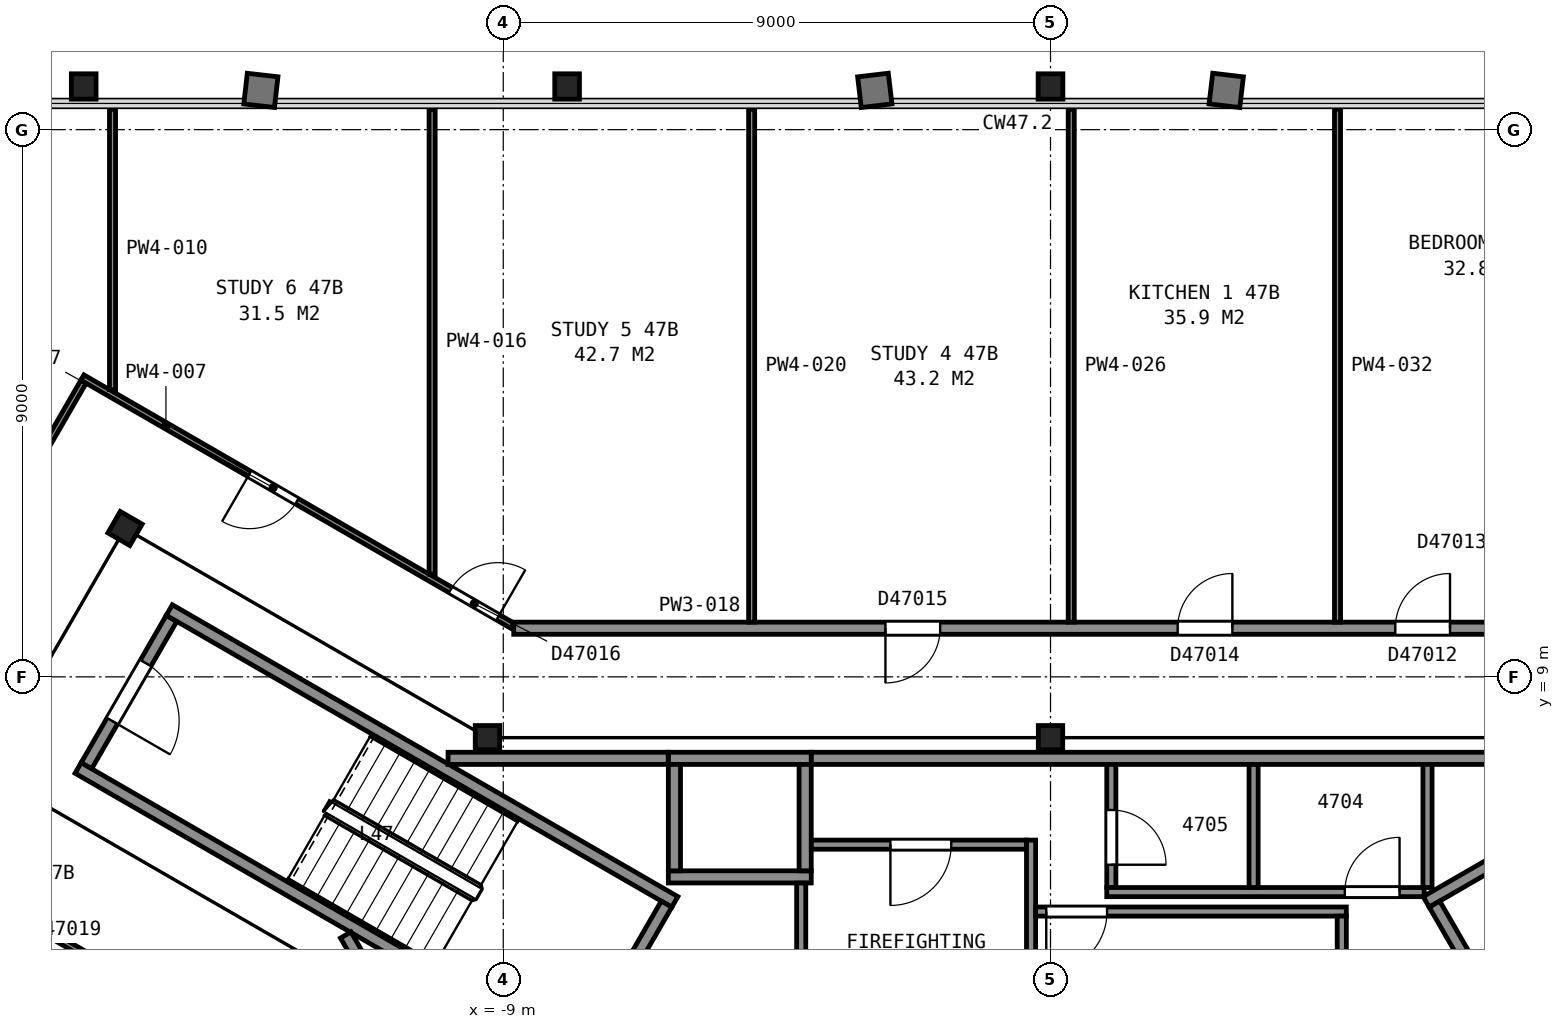
"""IFC4 building model, lengths in metres.
Left out: names, types, materials, properties, quantities, classifications, styles, units other than length and angle.
Written with IfcOpenShell. Run it as: python <this file> out.ifc"""

import sys

from ifc_helpers import new_model, si_unit, direction, frame, frame_2d, origin, origin_2d, place, context, subcontext, project, spatial, rectangle, i_section, extrude, element, fill, save


model = new_model("IFC4")
c1 = context("Model", 3, precision=1e-05, world=origin(), true_north=direction((0.0, 1.0)))
c2 = subcontext(c1, "Body", "Model", "MODEL_VIEW")
j1 = project(units=[si_unit("LENGTHUNIT", "METRE"), si_unit("PLANEANGLEUNIT", "RADIAN")], contexts=[c1])
p1 = place(None, origin())
s1 = spatial("IfcSite", under=j1, at=p1, CompositionType="ELEMENT")
p2 = place(p1, origin())
s2 = spatial("IfcBuilding", under=s1, at=p2, CompositionType="ELEMENT")
p3 = place(p2, frame((0.0, 0.0, 189.5)))
s3 = spatial("IfcBuildingStorey", under=s2, at=p3, CompositionType="ELEMENT", Elevation=189.5)
p4 = place(p3, frame((0.0, 18.71, 0.03), z_axis=(0.0, 0.0, 1.0), x_axis=(1.0, 0.0, 0.0)))
e1 = element("IfcColumn", 1, at=p4, inside=s3, PredefinedType="COLUMN", context=c2, shape_type="SweptSolid", body=[
    extrude(i_section(OverallWidth=0.406, OverallDepth=0.417, WebThickness=0.03, FlangeThickness=0.048, FilletRadius=0.015, at=origin_2d()), origin(), (0.0, 0.0, 1.0), 3.67),
])
p5 = place(p3, frame((-7.95, 18.71, 0.035), z_axis=(0.0, 0.0, 1.0), x_axis=(1.0, 0.0, 0.0)))
e2 = element("IfcColumn", 2, at=p5, inside=s3, PredefinedType="COLUMN", context=c2, shape_type="SweptSolid", body=[
    extrude(i_section(OverallWidth=0.406, OverallDepth=0.417, WebThickness=0.03, FlangeThickness=0.048, FilletRadius=0.015, at=origin_2d()), origin(), (0.0, 0.0, 1.0), 3.665),
])
p6 = place(p3, frame((-15.9, 18.71, 0.04), z_axis=(0.0, 0.0, 1.0), x_axis=(1.0, 0.0, 0.0)))
e3 = element("IfcColumn", 3, at=p6, inside=s3, PredefinedType="COLUMN", context=c2, shape_type="SweptSolid", body=[
    extrude(i_section(OverallWidth=0.406, OverallDepth=0.417, WebThickness=0.03, FlangeThickness=0.048, FilletRadius=0.015, at=origin_2d()), origin(), (0.0, 0.0, 1.0), 3.66),
])
for number, where, z_axis, x_axis in (
    (4, (0.0, 8.0, 0.0), (0.0, 0.0, 1.0), (1.0, 0.0, 0.0)),
    (5, (-9.26, 8.0, 0.0), (0.0, 0.0, 1.0), (1.0, 0.0, 0.0)),
):
    element("IfcColumn", number, at=place(p3, frame(where, z_axis=z_axis, x_axis=x_axis)), inside=s3, PredefinedType="COLUMN", context=c2, shape_type="SweptSolid", body=[
        extrude(i_section(OverallWidth=0.401, OverallDepth=0.399, WebThickness=0.025, FlangeThickness=0.04, FilletRadius=0.015, at=origin_2d()), origin(), (0.0, 0.0, 1.0), 3.7),
    ])
p7 = place(p3, frame((-15.22, 11.44, 0.0), z_axis=(0.0, 0.0, 1.0), x_axis=(0.5, 0.866025403784, 0.0)))
e6 = element("IfcColumn", 6, at=p7, inside=s3, PredefinedType="COLUMN", context=c2, shape_type="SweptSolid", body=[
    extrude(i_section(OverallWidth=0.406, OverallDepth=0.417, WebThickness=0.03, FlangeThickness=0.048, FilletRadius=0.015, at=origin_2d()), origin(), (0.0, 0.0, 1.0), 3.7),
])
p8 = place(p3, frame((6.178, 5.299, 0.0), z_axis=(0.0, 0.0, 1.0), x_axis=(0.866019993635, 0.500009370536, 0.0)))
e7 = element("IfcWall", 7, at=p8, inside=s3, PredefinedType="PARTITIONING", context=c2, shape_type="SweptSolid", body=[
    extrude(rectangle(XDim=9.6, YDim=0.2, at=frame_2d((4.8, 0.0))), origin(), (0.0, 0.0, 1.0), 3.45),
])
p9 = place(p3, frame((7.715, 2.838, 0.0), z_axis=(0.0, 0.0, 1.0), x_axis=(-0.500049511043, 0.865996816683, 0.0)))
e8 = element("IfcWall", 8, at=p9, inside=s3, PredefinedType="PARTITIONING", context=c2, shape_type="SweptSolid", body=[
    extrude(rectangle(XDim=2.8, YDim=0.2, at=frame_2d((1.4, 0.0))), origin(), (0.0, 0.0, 1.0), 3.45),
])
p10 = place(p3, frame((-14.455, 9.962, 0.0), z_axis=(0.0, 0.0, 1.0), x_axis=(-0.500049511043, -0.865996816683, 0.0)))
e9 = element("IfcWall", 9, at=p10, inside=s3, PredefinedType="PARTITIONING", context=c2, shape_type="SweptSolid", body=[
    extrude(rectangle(XDim=2.8, YDim=0.2, at=frame_2d((1.4, 0.0))), origin(), (0.0, 0.0, 1.0), 3.45),
])
p11 = place(p10, frame((0.85, 0.0, 0.0)))
e10 = element("IfcOpeningElement", 10, at=p11, cuts=e9, PredefinedType="OPENING", context=c2, shape_type="SweptSolid", body=[
    extrude(rectangle(XDim=1.1, YDim=2.1, at=frame_2d((0.55, 1.05))), frame((0.0, 0.11, 0.0), z_axis=(0.0, -1.0, 0.0), x_axis=(1.0, 0.0, 0.0)), (0.0, 0.0, 1.0), 0.22),
])
for number, where, z_axis, x_axis in (
    (11, (-7.678, 2.701, 0.0), (0.0, 0.0, 1.0), (-0.866, 0.5, 0.0)),
    (12, (-6.178, 5.299, 0.0), (0.0, 0.0, 1.0), (-0.866, 0.5, 0.0)),
):
    element("IfcWall", number, at=place(p3, frame(where, z_axis=z_axis, x_axis=x_axis)), inside=s3, PredefinedType="PARTITIONING", context=c2, shape_type="SweptSolid", body=[
        extrude(rectangle(XDim=9.6, YDim=0.2, at=frame_2d((4.8, 0.0))), origin(), (0.0, 0.0, 1.0), 3.45),
    ])
p12 = place(p3, frame((-6.315, 5.262, 0.0), z_axis=(0.0, 0.0, 1.0), x_axis=(-0.500049511043, -0.865996816683, 0.0)))
e13 = element("IfcWall", 13, at=p12, inside=s3, PredefinedType="PARTITIONING", context=c2, shape_type="SweptSolid", body=[
    extrude(rectangle(XDim=2.8, YDim=0.2, at=frame_2d((1.4, 0.0))), origin(), (0.0, 0.0, 1.0), 3.45),
])
for number, where, z_axis, x_axis in (
    (14, (-6.285, 5.71, 0.0), (0.0, 0.0, 1.0), (1.0, 0.0, 0.0)),
    (15, (-6.285, 7.66, 0.0), (0.0, 0.0, 1.0), (1.0, 0.0, 0.0)),
):
    element("IfcWall", number, at=place(p3, frame(where, z_axis=z_axis, x_axis=x_axis)), inside=s3, PredefinedType="PARTITIONING", context=c2, shape_type="SweptSolid", body=[
        extrude(rectangle(XDim=2.35, YDim=0.2, at=frame_2d((1.175, 0.0))), origin(), (0.0, 0.0, 1.0), 3.7),
    ])
for number, where, z_axis, x_axis in (
    (16, (-4.035, 5.81, 0.0), (0.0, 0.0, 1.0), (0.0, 1.0, 0.0)),
    (17, (-6.185, 5.81, 0.0), (0.0, 0.0, 1.0), (0.0, 1.0, 0.0)),
):
    element("IfcWall", number, at=place(p3, frame(where, z_axis=z_axis, x_axis=x_axis)), inside=s3, PredefinedType="PARTITIONING", context=c2, shape_type="SweptSolid", body=[
        extrude(rectangle(XDim=1.75, YDim=0.2, at=frame_2d((0.875, 0.0))), origin(), (0.0, 0.0, 1.0), 3.7),
    ])
p13 = place(p3, frame((-11.591, 4.755, 0.0), z_axis=(0.0, 0.0, 1.0), x_axis=(0.500043977787, -0.866000011708, 0.0)))
e18 = element("IfcWall", 18, at=p13, inside=s3, PredefinedType="PARTITIONING", context=c2, shape_type="SweptSolid", body=[
    extrude(rectangle(XDim=6.617, YDim=0.2, at=frame_2d((3.308, 0.0))), origin(), (0.0, 0.0, 1.0), 3.45),
])
p14 = place(p13, frame((3.695, 0.0, 0.0)))
e19 = element("IfcOpeningElement", 19, at=p14, cuts=e18, PredefinedType="OPENING", context=c2, shape_type="SweptSolid", body=[
    extrude(rectangle(XDim=1.8, YDim=2.1, at=frame_2d((0.9, 1.05))), frame((0.0, 0.11, 0.0), z_axis=(0.0, -1.0, 0.0), x_axis=(1.0, 0.0, 0.0)), (0.0, 0.0, 1.0), 0.22),
])
p15 = place(p3, frame((-9.908, 7.66, 0.0), z_axis=(0.0, 0.0, 1.0), x_axis=(1.0, 0.0, 0.0)))
e20 = element("IfcWall", 20, at=p15, inside=s3, PredefinedType="PARTITIONING", context=c2, shape_type="SweptSolid", body=[
    extrude(rectangle(XDim=3.621, YDim=0.2, at=frame_2d((1.811, 0.0))), origin(), (0.0, 0.0, 1.0), 3.45),
])
p16 = place(p3, frame((-4.1, 2.085, 0.0), z_axis=(0.0, 0.0, 1.0), x_axis=(0.0, 1.0, 0.0)))
e21 = element("IfcWall", 21, at=p16, inside=s3, PredefinedType="PARTITIONING", context=c2, shape_type="SweptSolid", body=[
    extrude(rectangle(XDim=3.523, YDim=0.15, at=frame_2d((1.761, 0.0))), origin(), (0.0, 0.0, 1.0), 3.45),
])
p17 = place(p3, frame((-3.933, 6.24, 0.0), z_axis=(0.0, 0.0, 1.0), x_axis=(1.0, 0.0, 0.0)))
e22 = element("IfcWall", 22, at=p17, inside=s3, PredefinedType="PARTITIONING", context=c2, shape_type="SweptSolid", body=[
    extrude(rectangle(XDim=3.538, YDim=0.15, at=frame_2d((1.769, 0.0))), origin(), (0.0, 0.0, 1.0), 3.45),
])
p18 = place(p17, frame((1.3, 0.0, 0.0)))
e23 = element("IfcOpeningElement", 23, at=p18, cuts=e22, PredefinedType="OPENING", context=c2, shape_type="SweptSolid", body=[
    extrude(rectangle(XDim=1.0, YDim=2.1, at=frame_2d((0.5, 1.05))), frame((0.0, 0.085, 0.0), z_axis=(0.0, -1.0, 0.0), x_axis=(1.0, 0.0, 0.0)), (0.0, 0.0, 1.0), 0.17),
])
p19 = place(p3, frame((-3.933, 7.66, 0.0), z_axis=(0.0, 0.0, 1.0), x_axis=(1.0, 0.0, 0.0)))
e24 = element("IfcWall", 24, at=p19, inside=s3, PredefinedType="PARTITIONING", context=c2, shape_type="SweptSolid", body=[
    extrude(rectangle(XDim=13.841, YDim=0.2, at=frame_2d((6.92, 0.0))), origin(), (0.0, 0.0, 1.0), 3.45),
])
p20 = place(p3, frame((-0.32, 2.252, 0.0), z_axis=(0.0, 0.0, 1.0), x_axis=(0.0, 1.0, 0.0)))
e25 = element("IfcWall", 25, at=p20, inside=s3, PredefinedType="PARTITIONING", context=c2, shape_type="SweptSolid", body=[
    extrude(rectangle(XDim=4.063, YDim=0.15, at=frame_2d((2.031, 0.0))), origin(), (0.0, 0.0, 1.0), 3.45),
])
p21 = place(p3, frame((-0.245, 5.14, 0.0), z_axis=(0.0, 0.0, 1.0), x_axis=(1.0, 0.0, 0.0)))
e26 = element("IfcWall", 26, at=p21, inside=s3, PredefinedType="PARTITIONING", context=c2, shape_type="SweptSolid", body=[
    extrude(rectangle(XDim=5.11, YDim=0.15, at=frame_2d((2.555, 0.0))), origin(), (0.0, 0.0, 1.0), 3.45),
])
p22 = place(p21, frame((0.175, 0.0, 0.0)))
e27 = element("IfcOpeningElement", 27, at=p22, cuts=e26, PredefinedType="OPENING", context=c2, shape_type="SweptSolid", body=[
    extrude(rectangle(XDim=1.0, YDim=2.1, at=frame_2d((0.5, 1.05))), frame((0.0, 0.085, 0.0), z_axis=(0.0, -1.0, 0.0), x_axis=(1.0, 0.0, 0.0)), (0.0, 0.0, 1.0), 0.17),
])
p23 = place(p3, frame((1.0, 7.56, 0.0), z_axis=(0.0, 0.0, 1.0), x_axis=(0.0, -1.0, 0.0)))
e28 = element("IfcWall", 28, at=p23, inside=s3, PredefinedType="PARTITIONING", context=c2, shape_type="SweptSolid", body=[
    extrude(rectangle(XDim=2.025, YDim=0.15, at=frame_2d((1.013, 0.0))), origin(), (0.0, 0.0, 1.0), 3.45),
])
p24 = place(p23, frame((0.75, 0.0, 0.0)))
e29 = element("IfcOpeningElement", 29, at=p24, cuts=e28, PredefinedType="OPENING", context=c2, shape_type="SweptSolid", body=[
    extrude(rectangle(XDim=0.9, YDim=2.1, at=frame_2d((0.45, 1.05))), frame((0.0, 0.085, 0.0), z_axis=(0.0, -1.0, 0.0), x_axis=(1.0, 0.0, 0.0)), (0.0, 0.0, 1.0), 0.17),
])
p25 = place(p3, frame((0.925, 5.46, 0.0), z_axis=(0.0, 0.0, 1.0), x_axis=(1.0, 0.0, 0.0)))
e30 = element("IfcWall", 30, at=p25, inside=s3, PredefinedType="PARTITIONING", context=c2, shape_type="SweptSolid", body=[
    extrude(rectangle(XDim=5.22, YDim=0.15, at=frame_2d((2.61, 0.0))), origin(), (0.0, 0.0, 1.0), 3.45),
])
p26 = place(p25, frame((3.915, 0.0, 0.0)))
e31 = element("IfcOpeningElement", 31, at=p26, cuts=e30, PredefinedType="OPENING", context=c2, shape_type="SweptSolid", body=[
    extrude(rectangle(XDim=0.9, YDim=2.1, at=frame_2d((0.45, 1.05))), frame((0.0, 0.085, 0.0), z_axis=(0.0, -1.0, 0.0), x_axis=(1.0, 0.0, 0.0)), (0.0, 0.0, 1.0), 0.17),
])
p27 = place(p3, frame((3.34, 5.535, 0.0), z_axis=(0.0, 0.0, 1.0), x_axis=(0.0, 1.0, 0.0)))
e32 = element("IfcWall", 32, at=p27, inside=s3, PredefinedType="PARTITIONING", context=c2, shape_type="SweptSolid", body=[
    extrude(rectangle(XDim=2.025, YDim=0.15, at=frame_2d((1.013, 0.0))), origin(), (0.0, 0.0, 1.0), 3.45),
])
p28 = place(p3, frame((4.79, 2.085, 0.0), z_axis=(0.0, 0.0, 1.0), x_axis=(0.0, 1.0, 0.0)))
e33 = element("IfcWall", 33, at=p28, inside=s3, PredefinedType="PARTITIONING", context=c2, shape_type="SweptSolid", body=[
    extrude(rectangle(XDim=2.98, YDim=0.15, at=frame_2d((1.49, 0.0))), origin(), (0.0, 0.0, 1.0), 3.45),
])
p29 = place(p3, frame((6.2, 5.535, 0.0), z_axis=(0.0, 0.0, 1.0), x_axis=(0.0, 1.0, 0.0)))
e34 = element("IfcWall", 34, at=p29, inside=s3, PredefinedType="PARTITIONING", context=c2, shape_type="SweptSolid", body=[
    extrude(rectangle(XDim=2.025, YDim=0.15, at=frame_2d((1.013, 0.0))), origin(), (0.0, 0.0, 1.0), 3.45),
])
p30 = place(p3, frame((-19.955, 6.844, 0.0), z_axis=(0.0, 0.0, 1.0), x_axis=(0.500415732313, 0.865785247537, 0.0)))
e35 = element("IfcWall", 35, at=p30, inside=s3, PredefinedType="PARTITIONING", context=c2, shape_type="SweptSolid", body=[
    extrude(rectangle(XDim=8.097, YDim=0.1, at=frame_2d((4.049, 0.0))), origin(), (0.0, 0.0, 1.0), 2.713),
])
p31 = place(p30, frame((3.45, 0.0, 0.0)))
e36 = element("IfcOpeningElement", 36, at=p31, cuts=e35, PredefinedType="OPENING", context=c2, shape_type="SweptSolid", body=[
    extrude(rectangle(XDim=1.2, YDim=2.1, at=frame_2d((0.6, 1.05))), frame((0.0, 0.06, 0.0), z_axis=(0.0, -1.0, 0.0), x_axis=(1.0, 0.0, 0.0)), (0.0, 0.0, 1.0), 0.12),
])
p32 = place(p3, frame((-12.952, 2.744, 0.0), z_axis=(0.0, 0.0, 1.0), x_axis=(-0.86608949446, 0.499888975259, 0.0)))
e37 = element("IfcWall", 37, at=p32, inside=s3, PredefinedType="PARTITIONING", context=c2, shape_type="SweptSolid", body=[
    extrude(rectangle(XDim=8.165, YDim=0.1, at=frame_2d((4.083, 0.0))), origin(), (0.0, 0.0, 1.0), 2.713),
])
p33 = place(p32, frame((4.741, 0.0, 0.0)))
e38 = element("IfcOpeningElement", 38, at=p33, cuts=e37, PredefinedType="OPENING", context=c2, shape_type="SweptSolid", body=[
    extrude(rectangle(XDim=0.9, YDim=2.1, at=frame_2d((0.45, 1.05))), frame((0.0, 0.06, 0.0), z_axis=(0.0, -1.0, 0.0), x_axis=(1.0, 0.0, 0.0)), (0.0, 0.0, 1.0), 0.12),
])
p34 = place(p32, frame((0.928, 0.0, 0.0)))
e39 = element("IfcOpeningElement", 39, at=p34, cuts=e37, PredefinedType="OPENING", context=c2, shape_type="SweptSolid", body=[
    extrude(rectangle(XDim=0.9, YDim=2.1, at=frame_2d((0.45, 1.05))), frame((0.0, 0.06, 0.0), z_axis=(0.0, -1.0, 0.0), x_axis=(1.0, 0.0, 0.0)), (0.0, 0.0, 1.0), 0.12),
])
p35 = place(p3, frame((-15.921, 13.923, 0.0), z_axis=(0.0, 0.0, 1.0), x_axis=(0.866088973199, -0.499889878377, 0.0)))
e40 = element("IfcWall", 40, at=p35, inside=s3, PredefinedType="PARTITIONING", context=c2, shape_type="SweptSolid", body=[
    extrude(rectangle(XDim=8.163, YDim=0.1, at=frame_2d((4.082, 0.0))), origin(), (0.0, 0.0, 1.0), 2.713),
])
p36 = place(p35, frame((6.99, 0.0, 0.0)))
e41 = element("IfcOpeningElement", 41, at=p36, cuts=e40, PredefinedType="OPENING", context=c2, shape_type="SweptSolid", body=[
    extrude(rectangle(XDim=0.9, YDim=2.1, at=frame_2d((0.45, 1.05))), frame((0.0, 0.06, 0.0), z_axis=(0.0, -1.0, 0.0), x_axis=(1.0, 0.0, 0.0)), (0.0, 0.0, 1.0), 0.12),
])
p37 = place(p35, frame((3.172, 0.0, 0.0)))
e42 = element("IfcOpeningElement", 42, at=p37, cuts=e40, PredefinedType="OPENING", context=c2, shape_type="SweptSolid", body=[
    extrude(rectangle(XDim=0.9, YDim=2.1, at=frame_2d((0.45, 1.05))), frame((0.0, 0.06, 0.0), z_axis=(0.0, -1.0, 0.0), x_axis=(1.0, 0.0, 0.0)), (0.0, 0.0, 1.0), 0.12),
])
p38 = place(p3, frame((-15.426, 13.724, 0.0), z_axis=(0.0, 0.0, 1.0), x_axis=(0.0, 1.0, 0.0)))
e43 = element("IfcWall", 43, at=p38, inside=s3, PredefinedType="PARTITIONING", context=c2, shape_type="SweptSolid", body=[
    extrude(rectangle(XDim=4.611, YDim=0.1, at=frame_2d((2.306, 0.0))), origin(), (0.0, 0.0, 1.0), 2.713),
])
p39 = place(p3, frame((-10.17, 10.691, 0.0), z_axis=(0.0, 0.0, 1.0), x_axis=(0.0, 1.0, 0.0)))
e44 = element("IfcWall", 44, at=p39, inside=s3, PredefinedType="PARTITIONING", context=c2, shape_type="SweptSolid", body=[
    extrude(rectangle(XDim=7.644, YDim=0.1, at=frame_2d((3.822, 0.0))), origin(), (0.0, 0.0, 1.0), 2.713),
])
p40 = place(p3, frame((-8.828, 9.8, 0.0), z_axis=(0.0, 0.0, 1.0), x_axis=(1.0, 0.0, 0.0)))
e45 = element("IfcWall", 45, at=p40, inside=s3, PredefinedType="PARTITIONING", context=c2, shape_type="SweptSolid", body=[
    extrude(rectangle(XDim=17.706, YDim=0.2, at=frame_2d((8.853, 0.0))), origin(), (0.0, 0.0, 1.0), 2.713),
])
p41 = place(p40, frame((14.498, 0.0, 0.0)))
e46 = element("IfcOpeningElement", 46, at=p41, cuts=e45, PredefinedType="OPENING", context=c2, shape_type="SweptSolid", body=[
    extrude(rectangle(XDim=0.9, YDim=2.1, at=frame_2d((0.45, 1.05))), frame((0.0, 0.11, 0.0), z_axis=(0.0, -1.0, 0.0), x_axis=(1.0, 0.0, 0.0)), (0.0, 0.0, 1.0), 0.22),
])
p42 = place(p40, frame((10.919, 0.0, 0.0)))
e47 = element("IfcOpeningElement", 47, at=p42, cuts=e45, PredefinedType="OPENING", context=c2, shape_type="SweptSolid", body=[
    extrude(rectangle(XDim=0.9, YDim=2.1, at=frame_2d((0.45, 1.05))), frame((0.0, 0.11, 0.0), z_axis=(0.0, -1.0, 0.0), x_axis=(1.0, 0.0, 0.0)), (0.0, 0.0, 1.0), 0.22),
])
p43 = place(p40, frame((6.113, 0.0, 0.0)))
e48 = element("IfcOpeningElement", 48, at=p43, cuts=e45, PredefinedType="OPENING", context=c2, shape_type="SweptSolid", body=[
    extrude(rectangle(XDim=0.9, YDim=2.1, at=frame_2d((0.45, 1.05))), frame((0.0, 0.11, 0.0), z_axis=(0.0, -1.0, 0.0), x_axis=(1.0, 0.0, 0.0)), (0.0, 0.0, 1.0), 0.22),
])
for number, where, z_axis, x_axis in (
    (49, (-4.915, 9.9, 0.0), (0.0, 0.0, 1.0), (0.0, 1.0, 0.0)),
    (50, (0.341, 9.9, 0.0), (0.0, 0.0, 1.0), (0.0, 1.0, 0.0)),
    (51, (4.72, 9.9, 0.0), (0.0, 0.0, 1.0), (0.0, 1.0, 0.0)),
):
    element("IfcWall", number, at=place(p3, frame(where, z_axis=z_axis, x_axis=x_axis)), inside=s3, PredefinedType="PARTITIONING", context=c2, shape_type="SweptSolid", body=[
        extrude(rectangle(XDim=8.435, YDim=0.1, at=frame_2d((4.218, 0.0))), origin(), (0.0, 0.0, 1.0), 2.713),
    ])
p44 = place(p11, origin())
e52 = element("IfcDoor", 52, at=p44, inside=s3, OperationType="SINGLE_SWING_RIGHT", PredefinedType="DOOR", context=c2, shape_type="SweptSolid", body=[
    extrude(rectangle(XDim=1.1, YDim=2.1, at=frame_2d((0.55, 1.05))), frame((0.0, 0.025, 0.0), z_axis=(0.0, -1.0, 0.0), x_axis=(1.0, 0.0, 0.0)), (0.0, 0.0, 1.0), 0.05),
])
fill(e10, e52)
p45 = place(p18, origin())
e53 = element("IfcDoor", 53, at=p45, inside=s3, OperationType="SINGLE_SWING_LEFT", PredefinedType="DOOR", context=c2, shape_type="SweptSolid", body=[
    extrude(rectangle(XDim=1.0, YDim=2.1, at=frame_2d((0.5, 1.05))), frame((0.0, 0.025, 0.0), z_axis=(0.0, -1.0, 0.0), x_axis=(1.0, 0.0, 0.0)), (0.0, 0.0, 1.0), 0.05),
])
fill(e23, e53)
p46 = place(p22, origin())
e54 = element("IfcDoor", 54, at=p46, inside=s3, OperationType="SINGLE_SWING_LEFT", PredefinedType="DOOR", context=c2, shape_type="SweptSolid", body=[
    extrude(rectangle(XDim=1.0, YDim=2.1, at=frame_2d((0.5, 1.05))), frame((0.0, 0.025, 0.0), z_axis=(0.0, -1.0, 0.0), x_axis=(1.0, 0.0, 0.0)), (0.0, 0.0, 1.0), 0.05),
])
fill(e27, e54)
p47 = place(p24, origin())
e55 = element("IfcDoor", 55, at=p47, inside=s3, OperationType="SINGLE_SWING_RIGHT", PredefinedType="DOOR", context=c2, shape_type="SweptSolid", body=[
    extrude(rectangle(XDim=0.9, YDim=2.1, at=frame_2d((0.45, 1.05))), frame((0.0, 0.025, 0.0), z_axis=(0.0, -1.0, 0.0), x_axis=(1.0, 0.0, 0.0)), (0.0, 0.0, 1.0), 0.05),
])
fill(e29, e55)
p48 = place(p26, origin())
e56 = element("IfcDoor", 56, at=p48, inside=s3, OperationType="SINGLE_SWING_RIGHT", PredefinedType="DOOR", context=c2, shape_type="SweptSolid", body=[
    extrude(rectangle(XDim=0.9, YDim=2.1, at=frame_2d((0.45, 1.05))), frame((0.0, 0.025, 0.0), z_axis=(0.0, -1.0, 0.0), x_axis=(1.0, 0.0, 0.0)), (0.0, 0.0, 1.0), 0.05),
])
fill(e31, e56)
p49 = place(p36, origin())
e57 = element("IfcDoor", 57, at=p49, inside=s3, OperationType="SINGLE_SWING_RIGHT", PredefinedType="DOOR", context=c2, shape_type="SweptSolid", body=[
    extrude(rectangle(XDim=0.9, YDim=2.1, at=frame_2d((0.45, 1.05))), frame((0.0, 0.025, 0.0), z_axis=(0.0, -1.0, 0.0), x_axis=(1.0, 0.0, 0.0)), (0.0, 0.0, 1.0), 0.05),
])
fill(e41, e57)
p50 = place(p37, origin())
e58 = element("IfcDoor", 58, at=p50, inside=s3, OperationType="SINGLE_SWING_LEFT", PredefinedType="DOOR", context=c2, shape_type="SweptSolid", body=[
    extrude(rectangle(XDim=0.9, YDim=2.1, at=frame_2d((0.45, 1.05))), frame((0.0, 0.025, 0.0), z_axis=(0.0, -1.0, 0.0), x_axis=(1.0, 0.0, 0.0)), (0.0, 0.0, 1.0), 0.05),
])
fill(e42, e58)
p51 = place(p41, origin())
e59 = element("IfcDoor", 59, at=p51, inside=s3, OperationType="SINGLE_SWING_RIGHT", PredefinedType="DOOR", context=c2, shape_type="SweptSolid", body=[
    extrude(rectangle(XDim=0.9, YDim=2.1, at=frame_2d((0.45, 1.05))), frame((0.0, 0.025, 0.0), z_axis=(0.0, -1.0, 0.0), x_axis=(1.0, 0.0, 0.0)), (0.0, 0.0, 1.0), 0.05),
])
fill(e46, e59)
p52 = place(p42, origin())
e60 = element("IfcDoor", 60, at=p52, inside=s3, OperationType="SINGLE_SWING_RIGHT", PredefinedType="DOOR", context=c2, shape_type="SweptSolid", body=[
    extrude(rectangle(XDim=0.9, YDim=2.1, at=frame_2d((0.45, 1.05))), frame((0.0, 0.025, 0.0), z_axis=(0.0, -1.0, 0.0), x_axis=(1.0, 0.0, 0.0)), (0.0, 0.0, 1.0), 0.05),
])
fill(e47, e60)
p53 = place(p43, origin())
e61 = element("IfcDoor", 61, at=p53, inside=s3, OperationType="SINGLE_SWING_LEFT", PredefinedType="DOOR", context=c2, shape_type="SweptSolid", body=[
    extrude(rectangle(XDim=0.9, YDim=2.1, at=frame_2d((0.45, 1.05))), frame((0.0, 0.025, 0.0), z_axis=(0.0, -1.0, 0.0), x_axis=(1.0, 0.0, 0.0)), (0.0, 0.0, 1.0), 0.05),
])
fill(e48, e61)
save(model, sys.argv[1])
